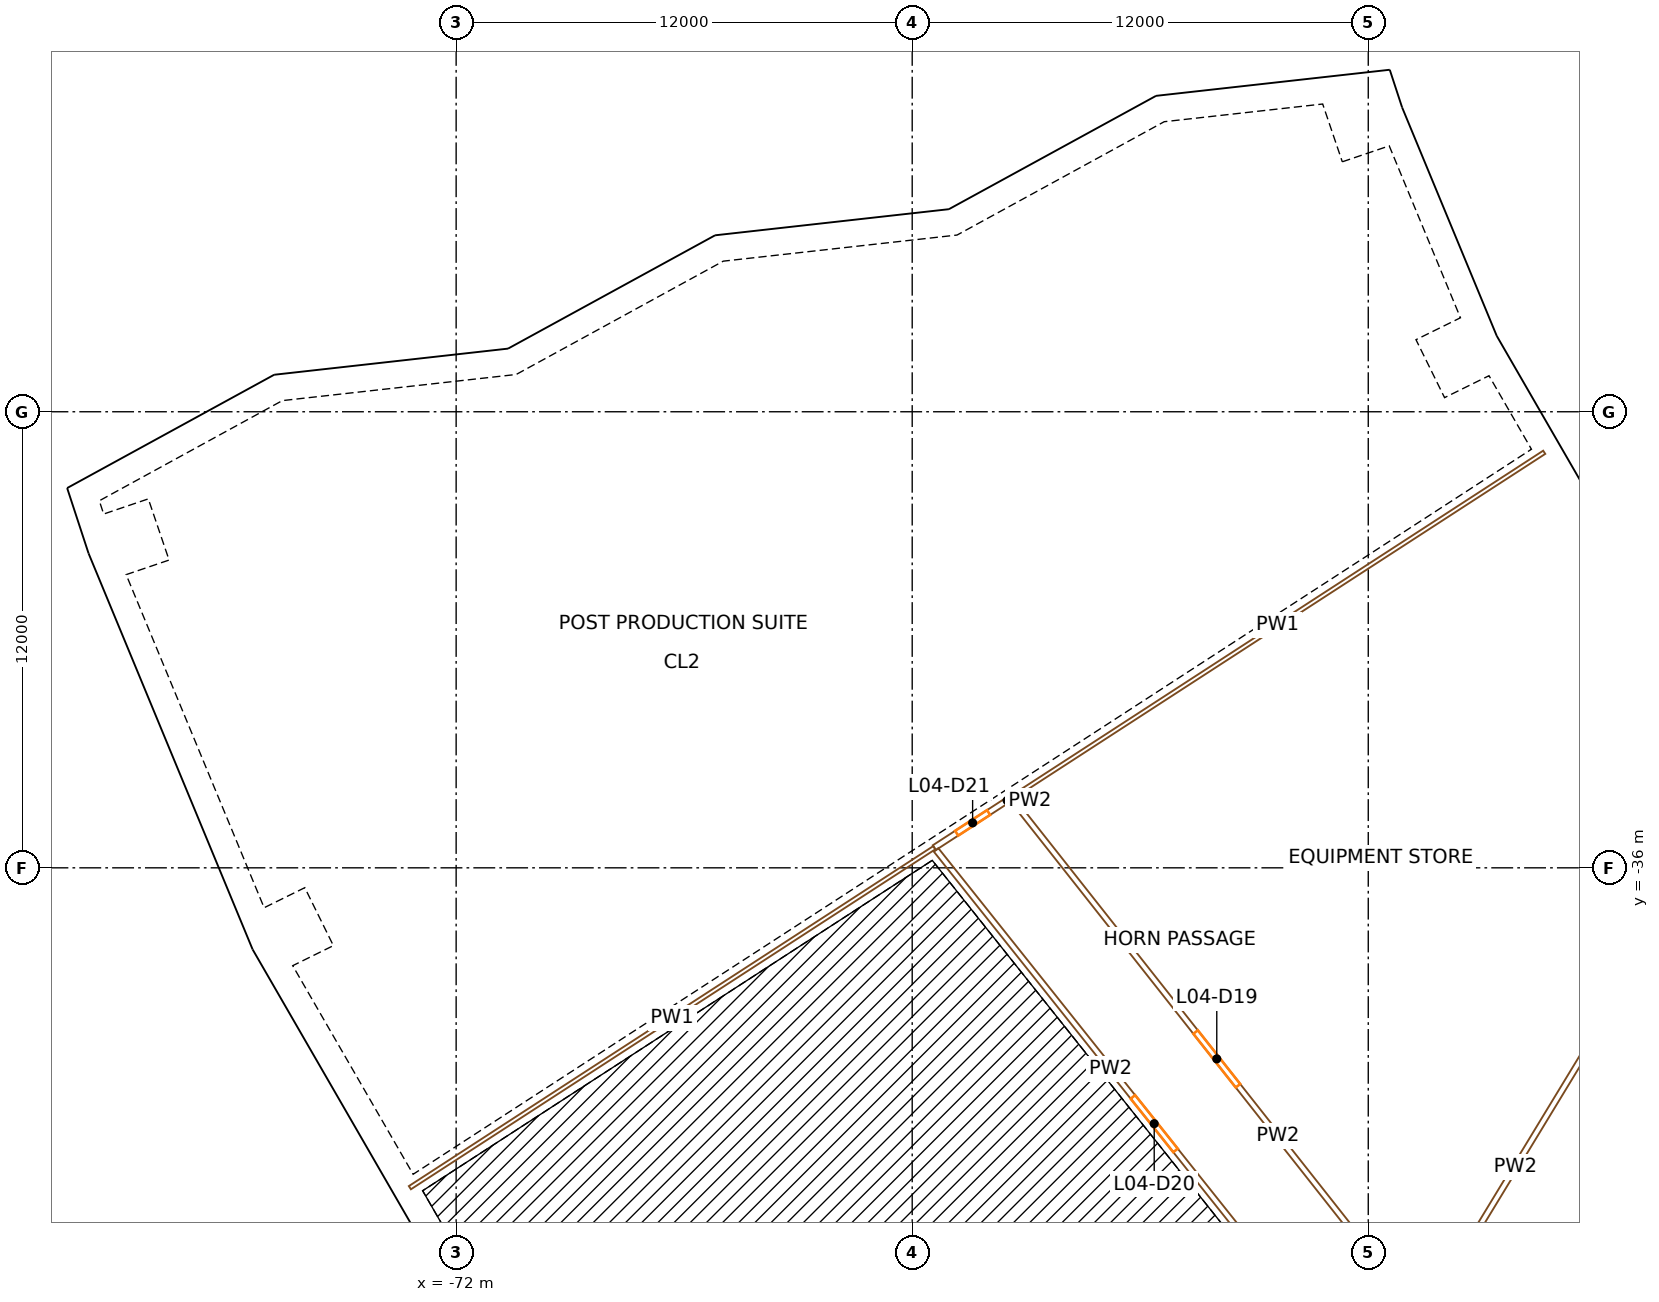
"""IFC4 building model, lengths in metres.
Left out: names, types, materials, properties, quantities, classifications, styles, units other than length and angle.
Written with IfcOpenShell. Run it as: python <this file> out.ifc"""

import sys

from ifc_helpers import new_model, si_unit, direction, frame, frame_2d, origin, origin_2d, place, context, subcontext, project, spatial, rectangle, extrude, element, fill, save


model = new_model("IFC4")
c1 = context("Model", 3, precision=1e-05, world=origin(), true_north=direction((0.0, 1.0)))
c2 = subcontext(c1, "Body", "Model", "MODEL_VIEW")
j1 = project(units=[si_unit("LENGTHUNIT", "METRE"), si_unit("PLANEANGLEUNIT", "RADIAN")], contexts=[c1])
p1 = place(None, origin())
s1 = spatial("IfcSite", under=j1, at=p1, CompositionType="ELEMENT")
p2 = place(p1, origin())
s2 = spatial("IfcBuilding", under=s1, at=p2, CompositionType="ELEMENT")
p3 = place(p2, frame((0.0, 0.0, 31.5)))
s3 = spatial("IfcBuildingStorey", under=s2, at=p3, CompositionType="ELEMENT", Elevation=31.5)
p4 = place(p3, frame((-48.057, -16.313, 0.0), z_axis=(0.0, 0.0, 1.0), x_axis=(0.321439465303, -0.946930129495, 0.0)))
e1 = element("IfcColumn", 1, at=p4, inside=s3, PredefinedType="COLUMN", context=c2, shape_type="SweptSolid", body=[
    extrude(rectangle(XDim=1.1, YDim=1.3, at=origin_2d()), origin(), (0.0, 0.0, 1.0), 4.5),
])
for number, where, z_axis, x_axis in (
    (2, (-55.159, -18.724, 0.0), (0.0, 0.0, 1.0), (0.321, -0.947, 0.0)),
    (3, (-73.624, -24.992, 0.0), (0.0, 0.0, 1.0), (0.321, -0.947, 0.0)),
):
    element("IfcColumn", number, at=place(p3, frame(where, z_axis=z_axis, x_axis=x_axis)), inside=s3, PredefinedType="COLUMN", context=c2, shape_type="SweptSolid", body=[
        extrude(rectangle(XDim=1.4, YDim=1.8, at=origin_2d()), origin(), (0.0, 0.0, 1.0), 4.5),
    ])
for number, where, z_axis, x_axis in (
    (4, (-80.726, -27.403, 0.0), (0.0, 0.0, 1.0), (0.321, -0.947, 0.0)),
    (5, (-45.516, -22.446, 0.0), (0.0, 0.0, 1.0), (0.442, -0.897, 0.0)),
):
    element("IfcColumn", number, at=place(p3, frame(where, z_axis=z_axis, x_axis=x_axis)), inside=s3, PredefinedType="COLUMN", context=c2, shape_type="SweptSolid", body=[
        extrude(rectangle(XDim=1.1, YDim=1.3, at=origin_2d()), origin(), (0.0, 0.0, 1.0), 4.5),
    ])
for number, where, z_axis, x_axis in (
    (6, (-52.243, -25.763, 0.0), (0.0, 0.0, 1.0), (0.442, -0.897, 0.0)),
    (7, (-69.732, -34.388, 0.0), (0.0, 0.0, 1.0), (0.442, -0.897, 0.0)),
):
    element("IfcColumn", number, at=place(p3, frame(where, z_axis=z_axis, x_axis=x_axis)), inside=s3, PredefinedType="COLUMN", context=c2, shape_type="SweptSolid", body=[
        extrude(rectangle(XDim=1.4, YDim=1.8, at=origin_2d()), origin(), (0.0, 0.0, 1.0), 4.5),
    ])
for number, where, z_axis, x_axis in (
    (8, (-76.458, -37.705, 0.0), (0.0, 0.0, 1.0), (0.442, -0.897, 0.0)),
    (9, (-42.197, -28.195, 0.0), (0.0, 0.0, 1.0), (0.556, -0.831, 0.0)),
):
    element("IfcColumn", number, at=place(p3, frame(where, z_axis=z_axis, x_axis=x_axis)), inside=s3, PredefinedType="COLUMN", context=c2, shape_type="SweptSolid", body=[
        extrude(rectangle(XDim=1.1, YDim=1.3, at=origin_2d()), origin(), (0.0, 0.0, 1.0), 4.5),
    ])
for number, where, z_axis, x_axis in (
    (10, (-48.433, -32.362, 0.0), (0.0, 0.0, 1.0), (0.556, -0.831, 0.0)),
    (11, (-64.647, -43.196, 0.0), (0.0, 0.0, 1.0), (0.556, -0.831, 0.0)),
    (12, (-43.795, -38.407, 0.0), (0.0, 0.0, 1.0), (0.659, -0.752, 0.0)),
):
    element("IfcColumn", number, at=place(p3, frame(where, z_axis=z_axis, x_axis=x_axis)), inside=s3, PredefinedType="COLUMN", context=c2, shape_type="SweptSolid", body=[
        extrude(rectangle(XDim=1.4, YDim=1.8, at=origin_2d()), origin(), (0.0, 0.0, 1.0), 4.5),
    ])
p5 = place(p3, frame((-49.779, -57.191, 0.0), z_axis=(0.0, 0.0, 1.0), x_axis=(0.573577477574, 0.819151315216, 0.0)))
e13 = element("IfcWall", 13, at=p5, inside=s3, PredefinedType="SHEAR", context=c2, shape_type="SweptSolid", body=[
    extrude(rectangle(XDim=14.8, YDim=0.9, at=frame_2d((7.4, 0.0))), origin(), (0.0, 0.0, 1.0), 4.1),
])
p6 = place(p5, frame((6.7, 0.0, 0.0)))
e14 = element("IfcOpeningElement", 14, at=p6, cuts=e13, PredefinedType="OPENING", context=c2, shape_type="SweptSolid", body=[
    extrude(rectangle(XDim=1.4, YDim=2.1, at=frame_2d((0.7, 1.05))), frame((0.0, 0.46, 0.0), z_axis=(0.0, -1.0, 0.0), x_axis=(1.0, 0.0, 0.0)), (0.0, 0.0, 1.0), 0.92),
])
p7 = place(p3, frame((-47.373, -15.221, 0.0), z_axis=(0.0, 0.0, 1.0), x_axis=(-0.993827533543, -0.110936168908, 0.0)))
e15 = element("IfcWall", 15, at=p7, inside=s3, PredefinedType="SOLIDWALL", context=c2, shape_type="SweptSolid", body=[
    extrude(rectangle(XDim=6.265, YDim=0.45, at=frame_2d((3.133, 0.0))), origin(), (0.0, 0.0, 1.0), 3.2),
])
p8 = place(p3, frame((-53.659, -15.985, 0.0), z_axis=(0.0, 0.0, 1.0), x_axis=(-0.87728135657, -0.479976480064, 0.0)))
e16 = element("IfcWall", 16, at=p8, inside=s3, PredefinedType="SOLIDWALL", context=c2, shape_type="SweptSolid", body=[
    extrude(rectangle(XDim=5.885, YDim=0.45, at=frame_2d((2.943, 0.0))), origin(), (0.0, 0.0, 1.0), 3.2),
])
p9 = place(p3, frame((-58.881, -18.879, 0.0), z_axis=(0.0, 0.0, 1.0), x_axis=(-0.993818963433, -0.111012917816, 0.0)))
e17 = element("IfcWall", 17, at=p9, inside=s3, PredefinedType="SOLIDWALL", context=c2, shape_type="SweptSolid", body=[
    extrude(rectangle(XDim=6.36, YDim=0.45, at=frame_2d((3.18, 0.0))), origin(), (0.0, 0.0, 1.0), 3.2),
])
p10 = place(p3, frame((-65.261, -19.655, 0.0), z_axis=(0.0, 0.0, 1.0), x_axis=(-0.877230259454, -0.480069861477, 0.0)))
e18 = element("IfcWall", 18, at=p10, inside=s3, PredefinedType="SOLIDWALL", context=c2, shape_type="SweptSolid", body=[
    extrude(rectangle(XDim=5.884, YDim=0.45, at=frame_2d((2.942, 0.0))), origin(), (0.0, 0.0, 1.0), 3.2),
])
p11 = place(p3, frame((-70.481, -22.548, 0.0), z_axis=(0.0, 0.0, 1.0), x_axis=(-0.993813805196, -0.111059086081, 0.0)))
e19 = element("IfcWall", 19, at=p11, inside=s3, PredefinedType="SOLIDWALL", context=c2, shape_type="SweptSolid", body=[
    extrude(rectangle(XDim=6.362, YDim=0.45, at=frame_2d((3.181, 0.0))), origin(), (0.0, 0.0, 1.0), 3.2),
])
p12 = place(p3, frame((-76.863, -23.324, 0.0), z_axis=(0.0, 0.0, 1.0), x_axis=(-0.877209140108, -0.480108450781, 0.0)))
e20 = element("IfcWall", 20, at=p12, inside=s3, PredefinedType="SOLIDWALL", context=c2, shape_type="SweptSolid", body=[
    extrude(rectangle(XDim=5.553, YDim=0.45, at=frame_2d((2.776, 0.0))), origin(), (0.0, 0.0, 1.0), 3.2),
])
p13 = place(p3, frame((-47.331, -16.04, 0.0), z_axis=(0.0, 0.0, 1.0), x_axis=(-0.311474670585, 0.950254455177, 0.0)))
e21 = element("IfcWall", 21, at=p13, inside=s3, PredefinedType="SOLIDWALL", context=c2, shape_type="SweptSolid", body=[
    extrude(rectangle(XDim=0.571, YDim=0.45, at=frame_2d((0.285, 0.0))), origin(), (0.0, 0.0, 1.0), 3.2),
])
p14 = place(p3, frame((-44.81, -22.131, 0.0), z_axis=(0.0, 0.0, 1.0), x_axis=(-0.382692796414, 0.92387565374, 0.0)))
e22 = element("IfcWall", 22, at=p14, inside=s3, PredefinedType="SOLIDWALL", context=c2, shape_type="SweptSolid", body=[
    extrude(rectangle(XDim=6.576, YDim=0.45, at=frame_2d((3.288, 0.0))), origin(), (0.0, 0.0, 1.0), 3.2),
])
p15 = place(p14, frame((3.749, 0.0, 0.9)))
e23 = element("IfcOpeningElement", 23, at=p15, cuts=e22, PredefinedType="OPENING", context=c2, shape_type="SweptSolid", body=[
    extrude(rectangle(XDim=1.2, YDim=2.15, at=frame_2d((0.6, 1.075))), frame((0.0, 0.235, 0.0), z_axis=(0.0, -1.0, 0.0), x_axis=(1.0, 0.0, 0.0)), (0.0, 0.0, 1.0), 0.47),
])
p16 = place(p14, frame((1.648, 0.0, 0.9)))
e24 = element("IfcOpeningElement", 24, at=p16, cuts=e22, PredefinedType="OPENING", context=c2, shape_type="SweptSolid", body=[
    extrude(rectangle(XDim=1.2, YDim=2.15, at=frame_2d((0.6, 1.075))), frame((0.0, 0.235, 0.0), z_axis=(0.0, -1.0, 0.0), x_axis=(1.0, 0.0, 0.0)), (0.0, 0.0, 1.0), 0.47),
])
p17 = place(p3, frame((-41.583, -27.714, 0.0), z_axis=(0.0, 0.0, 1.0), x_axis=(-0.50000447882, 0.866022817921, 0.0)))
e25 = element("IfcWall", 25, at=p17, inside=s3, PredefinedType="SOLIDWALL", context=c2, shape_type="SweptSolid", body=[
    extrude(rectangle(XDim=6.419, YDim=0.45, at=frame_2d((3.21, 0.0))), origin(), (0.0, 0.0, 1.0), 3.2),
])
p18 = place(p17, frame((3.66, 0.0, 0.9)))
e26 = element("IfcOpeningElement", 26, at=p18, cuts=e25, PredefinedType="OPENING", context=c2, shape_type="SweptSolid", body=[
    extrude(rectangle(XDim=1.2, YDim=2.15, at=frame_2d((0.6, 1.075))), frame((0.0, 0.235, 0.0), z_axis=(0.0, -1.0, 0.0), x_axis=(1.0, 0.0, 0.0)), (0.0, 0.0, 1.0), 0.47),
])
p19 = place(p17, frame((1.56, 0.0, 0.9)))
e27 = element("IfcOpeningElement", 27, at=p19, cuts=e25, PredefinedType="OPENING", context=c2, shape_type="SweptSolid", body=[
    extrude(rectangle(XDim=1.2, YDim=2.15, at=frame_2d((0.6, 1.075))), frame((0.0, 0.235, 0.0), z_axis=(0.0, -1.0, 0.0), x_axis=(1.0, 0.0, 0.0)), (0.0, 0.0, 1.0), 0.47),
])
p20 = place(p3, frame((-82.032, -25.906, 0.0), z_axis=(0.0, 0.0, 1.0), x_axis=(0.311608566113, -0.950210556416, 0.0)))
e28 = element("IfcWall", 28, at=p20, inside=s3, PredefinedType="SOLIDWALL", context=c2, shape_type="SweptSolid", body=[
    extrude(rectangle(XDim=0.936, YDim=0.45, at=frame_2d((0.468, 0.0))), origin(), (0.0, 0.0, 1.0), 3.2),
])
p21 = place(p3, frame((-81.74, -26.796, 0.0), z_axis=(0.0, 0.0, 1.0), x_axis=(0.311634105085, -0.950202180879, 0.0)))
e29 = element("IfcWall", 29, at=p21, inside=s3, PredefinedType="SOLIDWALL", context=c2, shape_type="SweptSolid", body=[
    extrude(rectangle(XDim=0.91, YDim=0.45, at=frame_2d((0.455, 0.0))), origin(), (0.0, 0.0, 1.0), 3.2),
])
p22 = place(p3, frame((-81.449, -27.676, 0.0), z_axis=(0.0, 0.0, 1.0), x_axis=(0.382700611107, -0.923872416656, 0.0)))
e30 = element("IfcWall", 30, at=p22, inside=s3, PredefinedType="SOLIDWALL", context=c2, shape_type="SweptSolid", body=[
    extrude(rectangle(XDim=11.168, YDim=0.45, at=frame_2d((5.584, 0.0))), origin(), (0.0, 0.0, 1.0), 3.2),
])
p23 = place(p22, frame((3.951, 0.0, 0.9)))
e31 = element("IfcOpeningElement", 31, at=p23, cuts=e30, PredefinedType="OPENING", context=c2, shape_type="SweptSolid", body=[
    extrude(rectangle(XDim=1.2, YDim=2.15, at=frame_2d((0.6, 1.075))), frame((0.0, 0.235, 0.0), z_axis=(0.0, -1.0, 0.0), x_axis=(1.0, 0.0, 0.0)), (0.0, 0.0, 1.0), 0.47),
])
p24 = place(p22, frame((6.051, 0.0, 0.9)))
e32 = element("IfcOpeningElement", 32, at=p24, cuts=e30, PredefinedType="OPENING", context=c2, shape_type="SweptSolid", body=[
    extrude(rectangle(XDim=1.2, YDim=2.15, at=frame_2d((0.6, 1.075))), frame((0.0, 0.235, 0.0), z_axis=(0.0, -1.0, 0.0), x_axis=(1.0, 0.0, 0.0)), (0.0, 0.0, 1.0), 0.47),
])
p25 = place(p3, frame((-77.168, -38.022, 0.0), z_axis=(0.0, 0.0, 1.0), x_axis=(0.500001430823, -0.866024577697, 0.0)))
e33 = element("IfcWall", 33, at=p25, inside=s3, PredefinedType="SOLIDWALL", context=c2, shape_type="SweptSolid", body=[
    extrude(rectangle(XDim=11.312, YDim=0.45, at=frame_2d((5.656, 0.0))), origin(), (0.0, 0.0, 1.0), 3.2),
])
p26 = place(p25, frame((4.006, 0.0, 0.9)))
e34 = element("IfcOpeningElement", 34, at=p26, cuts=e33, PredefinedType="OPENING", context=c2, shape_type="SweptSolid", body=[
    extrude(rectangle(XDim=1.2, YDim=2.15, at=frame_2d((0.6, 1.075))), frame((0.0, 0.235, 0.0), z_axis=(0.0, -1.0, 0.0), x_axis=(1.0, 0.0, 0.0)), (0.0, 0.0, 1.0), 0.47),
])
p27 = place(p25, frame((6.106, 0.0, 0.9)))
e35 = element("IfcOpeningElement", 35, at=p27, cuts=e33, PredefinedType="OPENING", context=c2, shape_type="SweptSolid", body=[
    extrude(rectangle(XDim=1.2, YDim=2.15, at=frame_2d((0.6, 1.075))), frame((0.0, 0.235, 0.0), z_axis=(0.0, -1.0, 0.0), x_axis=(1.0, 0.0, 0.0)), (0.0, 0.0, 1.0), 0.47),
])
p28 = place(p3, frame((-73.217, -44.416, 0.0), z_axis=(0.0, 0.0, 1.0), x_axis=(0.839098650594, 0.543979277703, 0.0)))
e36 = element("IfcWall", 36, at=p28, inside=s3, PredefinedType="PARTITIONING", context=c2, shape_type="SweptSolid", body=[
    extrude(rectangle(XDim=16.445, YDim=0.1, at=frame_2d((8.223, 0.0))), origin(), (0.0, 0.0, 1.0), 3.1),
])
p29 = place(p3, frame((-59.418, -35.47, 0.0), z_axis=(0.0, 0.0, 1.0), x_axis=(0.839081673018, 0.544005465051, 0.0)))
e37 = element("IfcWall", 37, at=p29, inside=s3, PredefinedType="PARTITIONING", context=c2, shape_type="SweptSolid", body=[
    extrude(rectangle(XDim=2.402, YDim=0.15, at=frame_2d((1.201, 0.0))), origin(), (0.0, 0.0, 1.0), 3.1),
])
p30 = place(p29, frame((0.701, 0.0, 0.0)))
e38 = element("IfcOpeningElement", 38, at=p30, cuts=e37, PredefinedType="OPENING", context=c2, shape_type="SweptSolid", body=[
    extrude(rectangle(XDim=1.0, YDim=2.1, at=frame_2d((0.5, 1.05))), frame((0.0, 0.085, 0.0), z_axis=(0.0, -1.0, 0.0), x_axis=(1.0, 0.0, 0.0)), (0.0, 0.0, 1.0), 0.17),
])
p31 = place(p3, frame((-57.403, -34.164, 0.0), z_axis=(0.0, 0.0, 1.0), x_axis=(0.83909708633, 0.543981690604, 0.0)))
e39 = element("IfcWall", 39, at=p31, inside=s3, PredefinedType="PARTITIONING", context=c2, shape_type="SweptSolid", body=[
    extrude(rectangle(XDim=16.723, YDim=0.1, at=frame_2d((8.362, 0.0))), origin(), (0.0, 0.0, 1.0), 3.1),
])
p32 = place(p3, frame((-47.893, -49.935, 0.0), z_axis=(0.0, 0.0, 1.0), x_axis=(-0.623151769875, 0.782100934472, 0.0)))
e40 = element("IfcWall", 40, at=p32, inside=s3, PredefinedType="PARTITIONING", context=c2, shape_type="SweptSolid", body=[
    extrude(rectangle(XDim=18.419, YDim=0.15, at=frame_2d((9.21, 0.0))), origin(), (0.0, 0.0, 1.0), 3.1),
])
p33 = place(p32, frame((8.31, 0.0, 0.0)))
e41 = element("IfcOpeningElement", 41, at=p33, cuts=e40, PredefinedType="OPENING", context=c2, shape_type="SweptSolid", body=[
    extrude(rectangle(XDim=1.8, YDim=2.1, at=frame_2d((0.9, 1.05))), frame((0.0, 0.085, 0.0), z_axis=(0.0, -1.0, 0.0), x_axis=(1.0, 0.0, 0.0)), (0.0, 0.0, 1.0), 0.17),
])
p34 = place(p3, frame((-57.356, -34.223, 0.0), z_axis=(0.0, 0.0, 1.0), x_axis=(0.619510500346, -0.784988369316, 0.0)))
e42 = element("IfcWall", 42, at=p34, inside=s3, PredefinedType="PARTITIONING", context=c2, shape_type="SweptSolid", body=[
    extrude(rectangle(XDim=17.337, YDim=0.15, at=frame_2d((8.668, 0.0))), origin(), (0.0, 0.0, 1.0), 3.1),
])
p35 = place(p34, frame((7.769, 0.0, 0.0)))
e43 = element("IfcOpeningElement", 43, at=p35, cuts=e42, PredefinedType="OPENING", context=c2, shape_type="SweptSolid", body=[
    extrude(rectangle(XDim=1.8, YDim=2.1, at=frame_2d((0.9, 1.05))), frame((0.0, 0.085, 0.0), z_axis=(0.0, -1.0, 0.0), x_axis=(1.0, 0.0, 0.0)), (0.0, 0.0, 1.0), 0.17),
])
p36 = place(p3, frame((-41.648, -39.789, 0.0), z_axis=(0.0, 0.0, 1.0), x_axis=(-0.519144162426, -0.854686690325, 0.0)))
e44 = element("IfcWall", 44, at=p36, inside=s3, PredefinedType="PARTITIONING", context=c2, shape_type="SweptSolid", body=[
    extrude(rectangle(XDim=9.554, YDim=0.15, at=frame_2d((4.777, 0.0))), origin(), (0.0, 0.0, 1.0), 3.1),
])
p37 = place(p23, origin())
e45 = element("IfcWindow", 45, at=p37, inside=s3, PartitioningType="SINGLE_PANEL", PredefinedType="WINDOW", context=c2, shape_type="SweptSolid", body=[
    extrude(rectangle(XDim=1.2, YDim=2.15, at=frame_2d((0.6, 1.075))), frame((0.0, 0.03, 0.0), z_axis=(0.0, -1.0, 0.0), x_axis=(1.0, 0.0, 0.0)), (0.0, 0.0, 1.0), 0.06),
])
fill(e31, e45)
p38 = place(p24, origin())
e46 = element("IfcWindow", 46, at=p38, inside=s3, PartitioningType="SINGLE_PANEL", PredefinedType="WINDOW", context=c2, shape_type="SweptSolid", body=[
    extrude(rectangle(XDim=1.2, YDim=2.15, at=frame_2d((0.6, 1.075))), frame((0.0, 0.03, 0.0), z_axis=(0.0, -1.0, 0.0), x_axis=(1.0, 0.0, 0.0)), (0.0, 0.0, 1.0), 0.06),
])
fill(e32, e46)
p39 = place(p26, origin())
e47 = element("IfcWindow", 47, at=p39, inside=s3, PartitioningType="SINGLE_PANEL", PredefinedType="WINDOW", context=c2, shape_type="SweptSolid", body=[
    extrude(rectangle(XDim=1.2, YDim=2.15, at=frame_2d((0.6, 1.075))), frame((0.0, 0.03, 0.0), z_axis=(0.0, -1.0, 0.0), x_axis=(1.0, 0.0, 0.0)), (0.0, 0.0, 1.0), 0.06),
])
fill(e34, e47)
p40 = place(p27, origin())
e48 = element("IfcWindow", 48, at=p40, inside=s3, PartitioningType="SINGLE_PANEL", PredefinedType="WINDOW", context=c2, shape_type="SweptSolid", body=[
    extrude(rectangle(XDim=1.2, YDim=2.15, at=frame_2d((0.6, 1.075))), frame((0.0, 0.03, 0.0), z_axis=(0.0, -1.0, 0.0), x_axis=(1.0, 0.0, 0.0)), (0.0, 0.0, 1.0), 0.06),
])
fill(e35, e48)
p41 = place(p15, origin())
e49 = element("IfcWindow", 49, at=p41, inside=s3, PartitioningType="SINGLE_PANEL", PredefinedType="WINDOW", context=c2, shape_type="SweptSolid", body=[
    extrude(rectangle(XDim=1.2, YDim=2.15, at=frame_2d((0.6, 1.075))), frame((0.0, 0.03, 0.0), z_axis=(0.0, -1.0, 0.0), x_axis=(1.0, 0.0, 0.0)), (0.0, 0.0, 1.0), 0.06),
])
fill(e23, e49)
p42 = place(p16, origin())
e50 = element("IfcWindow", 50, at=p42, inside=s3, PartitioningType="SINGLE_PANEL", PredefinedType="WINDOW", context=c2, shape_type="SweptSolid", body=[
    extrude(rectangle(XDim=1.2, YDim=2.15, at=frame_2d((0.6, 1.075))), frame((0.0, 0.03, 0.0), z_axis=(0.0, -1.0, 0.0), x_axis=(1.0, 0.0, 0.0)), (0.0, 0.0, 1.0), 0.06),
])
fill(e24, e50)
p43 = place(p18, origin())
e51 = element("IfcWindow", 51, at=p43, inside=s3, PartitioningType="SINGLE_PANEL", PredefinedType="WINDOW", context=c2, shape_type="SweptSolid", body=[
    extrude(rectangle(XDim=1.2, YDim=2.15, at=frame_2d((0.6, 1.075))), frame((0.0, 0.03, 0.0), z_axis=(0.0, -1.0, 0.0), x_axis=(1.0, 0.0, 0.0)), (0.0, 0.0, 1.0), 0.06),
])
fill(e26, e51)
p44 = place(p19, origin())
e52 = element("IfcWindow", 52, at=p44, inside=s3, PartitioningType="SINGLE_PANEL", PredefinedType="WINDOW", context=c2, shape_type="SweptSolid", body=[
    extrude(rectangle(XDim=1.2, YDim=2.15, at=frame_2d((0.6, 1.075))), frame((0.0, 0.03, 0.0), z_axis=(0.0, -1.0, 0.0), x_axis=(1.0, 0.0, 0.0)), (0.0, 0.0, 1.0), 0.06),
])
fill(e27, e52)
p45 = place(p35, origin())
e53 = element("IfcDoor", 53, at=p45, inside=s3, OperationType="DOUBLE_DOOR_SINGLE_SWING", PredefinedType="DOOR", context=c2, shape_type="SweptSolid", body=[
    extrude(rectangle(XDim=1.8, YDim=2.1, at=frame_2d((0.9, 1.05))), frame((0.0, 0.025, 0.0), z_axis=(0.0, -1.0, 0.0), x_axis=(1.0, 0.0, 0.0)), (0.0, 0.0, 1.0), 0.05),
])
fill(e43, e53)
p46 = place(p33, origin())
e54 = element("IfcDoor", 54, at=p46, inside=s3, OperationType="DOUBLE_DOOR_SINGLE_SWING", PredefinedType="DOOR", context=c2, shape_type="SweptSolid", body=[
    extrude(rectangle(XDim=1.8, YDim=2.1, at=frame_2d((0.9, 1.05))), frame((0.0, 0.025, 0.0), z_axis=(0.0, -1.0, 0.0), x_axis=(1.0, 0.0, 0.0)), (0.0, 0.0, 1.0), 0.05),
])
fill(e41, e54)
p47 = place(p30, origin())
e55 = element("IfcDoor", 55, at=p47, inside=s3, OperationType="SINGLE_SWING_RIGHT", PredefinedType="DOOR", context=c2, shape_type="SweptSolid", body=[
    extrude(rectangle(XDim=1.0, YDim=2.1, at=frame_2d((0.5, 1.05))), frame((0.0, 0.025, 0.0), z_axis=(0.0, -1.0, 0.0), x_axis=(1.0, 0.0, 0.0)), (0.0, 0.0, 1.0), 0.05),
])
fill(e38, e55)
save(model, sys.argv[1])
